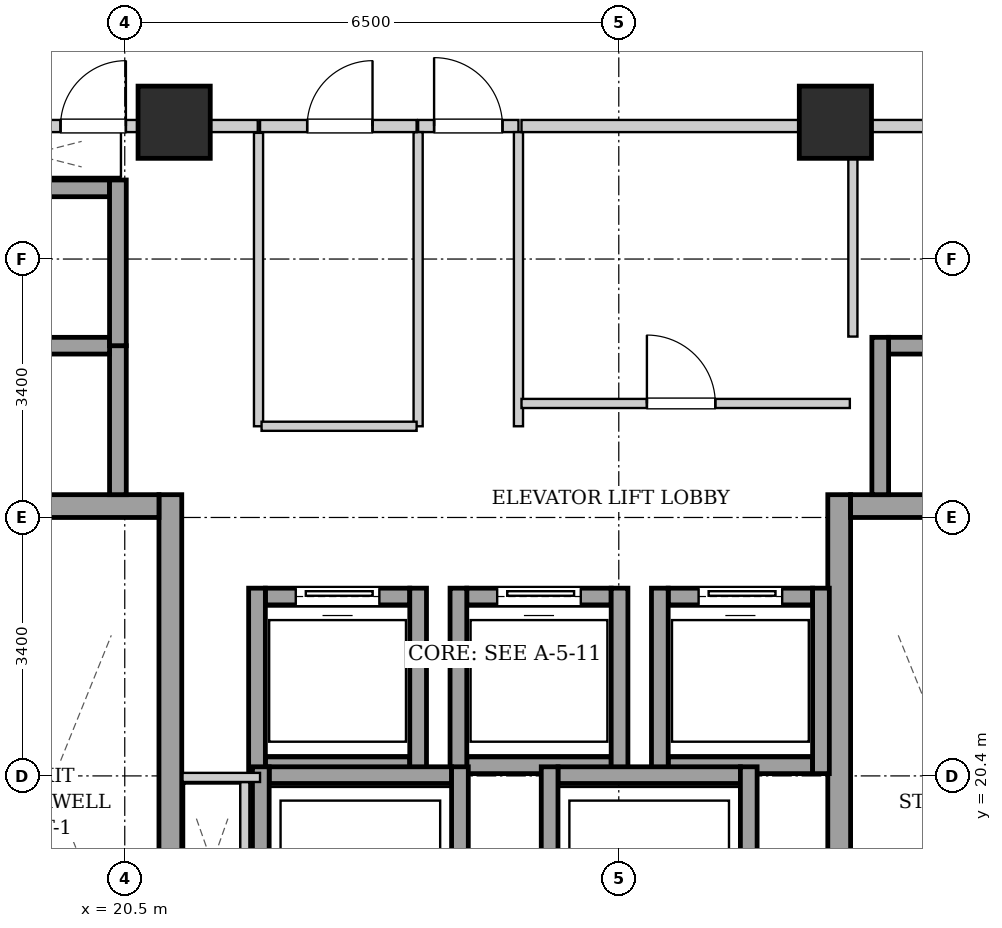
"""IFC4 building model, lengths in metres.
Left out: names, types, materials, properties, quantities, classifications, styles, units other than length and angle.
Written with IfcOpenShell. Run it as: python <this file> out.ifc"""

import sys

from ifc_helpers import new_model, si_unit, direction, frame, frame_2d, origin, origin_2d, place, context, subcontext, project, spatial, rectangle, extrude, element, fill, save


model = new_model("IFC4")
c1 = context("Model", 3, precision=1e-05, world=origin(), true_north=direction((0.0, 1.0)))
c2 = subcontext(c1, "Body", "Model", "MODEL_VIEW")
j1 = project(units=[si_unit("LENGTHUNIT", "METRE"), si_unit("PLANEANGLEUNIT", "RADIAN")], contexts=[c1])
p1 = place(None, origin())
s1 = spatial("IfcSite", under=j1, at=p1, CompositionType="ELEMENT")
p2 = place(p1, origin())
s2 = spatial("IfcBuilding", under=s1, at=p2, CompositionType="ELEMENT")
p3 = place(p2, frame((0.0, 0.0, 166.65)))
s3 = spatial("IfcBuildingStorey", under=s2, at=p3, CompositionType="ELEMENT", Elevation=166.65)
for number, where, z_axis, x_axis in (
    (1, (21.15, 29.0, 0.0), (0.0, 0.0, 1.0), (1.0, 0.0, 0.0)),
    (2, (29.85, 29.0, 0.0), (0.0, 0.0, 1.0), (1.0, 0.0, 0.0)),
):
    element("IfcColumn", number, at=place(p3, frame(where, z_axis=z_axis, x_axis=x_axis)), inside=s3, PredefinedType="COLUMN", context=c2, shape_type="SweptSolid", body=[
        extrude(rectangle(XDim=0.95, YDim=0.95, at=origin_2d()), origin(), (0.0, 0.0, 1.0), 3.25),
    ])
p4 = place(p3, frame((21.1, 15.1, 0.0), z_axis=(0.0, 0.0, 1.0), x_axis=(0.0, 1.0, 0.0)))
e3 = element("IfcWall", 3, at=p4, inside=s3, PredefinedType="SHEAR", context=c2, shape_type="SweptSolid", body=[
    extrude(rectangle(XDim=9.0, YDim=0.3, at=frame_2d((4.5, 0.0))), origin(), (0.0, 0.0, 1.0), 2.93),
])
p5 = place(p3, frame((18.1, 23.95, 0.0), z_axis=(0.0, 0.0, 1.0), x_axis=(1.0, 0.0, 0.0)))
e4 = element("IfcWall", 4, at=p5, inside=s3, PredefinedType="SHEAR", context=c2, shape_type="SweptSolid", body=[
    extrude(rectangle(XDim=2.85, YDim=0.3, at=frame_2d((1.425, 0.0))), origin(), (0.0, 0.0, 1.0), 2.93),
])
p6 = place(p3, frame((29.9, 15.1, 0.0), z_axis=(0.0, 0.0, 1.0), x_axis=(0.0, 1.0, 0.0)))
e5 = element("IfcWall", 5, at=p6, inside=s3, PredefinedType="SHEAR", context=c2, shape_type="SweptSolid", body=[
    extrude(rectangle(XDim=9.0, YDim=0.3, at=frame_2d((4.5, 0.0))), origin(), (0.0, 0.0, 1.0), 2.93),
])
p7 = place(p3, frame((30.05, 23.95, 0.0), z_axis=(0.0, 0.0, 1.0), x_axis=(1.0, 0.0, 0.0)))
e6 = element("IfcWall", 6, at=p7, inside=s3, PredefinedType="SHEAR", context=c2, shape_type="SweptSolid", body=[
    extrude(rectangle(XDim=2.85, YDim=0.3, at=frame_2d((1.425, 0.0))), origin(), (0.0, 0.0, 1.0), 2.93),
])
p8 = place(p3, frame((22.35, 20.54, 0.0), z_axis=(0.0, 0.0, 1.0), x_axis=(1.0, 0.0, 0.0)))
e7 = element("IfcWall", 7, at=p8, inside=s3, PredefinedType="SHEAR", context=c2, shape_type="SweptSolid", body=[
    extrude(rectangle(XDim=1.9, YDim=0.22, at=frame_2d((0.95, 0.0))), origin(), (0.0, 0.0, 1.0), 2.93),
])
p9 = place(p3, frame((22.35, 22.76, 0.0), z_axis=(0.0, 0.0, 1.0), x_axis=(1.0, 0.0, 0.0)))
e8 = element("IfcWall", 8, at=p9, inside=s3, PredefinedType="SHEAR", context=c2, shape_type="SweptSolid", body=[
    extrude(rectangle(XDim=1.9, YDim=0.22, at=frame_2d((0.95, 0.0))), origin(), (0.0, 0.0, 1.0), 2.93),
])
p10 = place(p9, frame((0.4, 0.0, 0.0)))
e9 = element("IfcOpeningElement", 9, at=p10, cuts=e8, PredefinedType="OPENING", context=c2, shape_type="SweptSolid", body=[
    extrude(rectangle(XDim=1.1, YDim=2.15, at=frame_2d((0.55, 1.075))), frame((0.0, 0.12, 0.0), z_axis=(0.0, -1.0, 0.0), x_axis=(1.0, 0.0, 0.0)), (0.0, 0.0, 1.0), 0.24),
])
for number, where, z_axis, x_axis in (
    (10, (22.24, 20.43, 0.0), (0.0, 0.0, 1.0), (0.0, 1.0, 0.0)),
    (11, (24.36, 20.43, 0.0), (0.0, 0.0, 1.0), (0.0, 1.0, 0.0)),
):
    element("IfcWall", number, at=place(p3, frame(where, z_axis=z_axis, x_axis=x_axis)), inside=s3, PredefinedType="SHEAR", context=c2, shape_type="SweptSolid", body=[
        extrude(rectangle(XDim=2.44, YDim=0.22, at=frame_2d((1.22, 0.0))), origin(), (0.0, 0.0, 1.0), 2.93),
    ])
p11 = place(p3, frame((25.0, 20.54, 0.0), z_axis=(0.0, 0.0, 1.0), x_axis=(1.0, 0.0, 0.0)))
e12 = element("IfcWall", 12, at=p11, inside=s3, PredefinedType="SHEAR", context=c2, shape_type="SweptSolid", body=[
    extrude(rectangle(XDim=1.9, YDim=0.22, at=frame_2d((0.95, 0.0))), origin(), (0.0, 0.0, 1.0), 2.93),
])
p12 = place(p3, frame((25.0, 22.76, 0.0), z_axis=(0.0, 0.0, 1.0), x_axis=(1.0, 0.0, 0.0)))
e13 = element("IfcWall", 13, at=p12, inside=s3, PredefinedType="SHEAR", context=c2, shape_type="SweptSolid", body=[
    extrude(rectangle(XDim=1.9, YDim=0.22, at=frame_2d((0.95, 0.0))), origin(), (0.0, 0.0, 1.0), 2.93),
])
p13 = place(p12, frame((0.4, 0.0, 0.0)))
e14 = element("IfcOpeningElement", 14, at=p13, cuts=e13, PredefinedType="OPENING", context=c2, shape_type="SweptSolid", body=[
    extrude(rectangle(XDim=1.1, YDim=2.15, at=frame_2d((0.55, 1.075))), frame((0.0, 0.12, 0.0), z_axis=(0.0, -1.0, 0.0), x_axis=(1.0, 0.0, 0.0)), (0.0, 0.0, 1.0), 0.24),
])
for number, where, z_axis, x_axis in (
    (15, (24.89, 20.43, 0.0), (0.0, 0.0, 1.0), (0.0, 1.0, 0.0)),
    (16, (27.01, 20.43, 0.0), (0.0, 0.0, 1.0), (0.0, 1.0, 0.0)),
):
    element("IfcWall", number, at=place(p3, frame(where, z_axis=z_axis, x_axis=x_axis)), inside=s3, PredefinedType="SHEAR", context=c2, shape_type="SweptSolid", body=[
        extrude(rectangle(XDim=2.44, YDim=0.22, at=frame_2d((1.22, 0.0))), origin(), (0.0, 0.0, 1.0), 2.93),
    ])
p14 = place(p3, frame((27.65, 20.54, 0.0), z_axis=(0.0, 0.0, 1.0), x_axis=(1.0, 0.0, 0.0)))
e17 = element("IfcWall", 17, at=p14, inside=s3, PredefinedType="SHEAR", context=c2, shape_type="SweptSolid", body=[
    extrude(rectangle(XDim=1.9, YDim=0.22, at=frame_2d((0.95, 0.0))), origin(), (0.0, 0.0, 1.0), 2.93),
])
p15 = place(p3, frame((27.65, 22.76, 0.0), z_axis=(0.0, 0.0, 1.0), x_axis=(1.0, 0.0, 0.0)))
e18 = element("IfcWall", 18, at=p15, inside=s3, PredefinedType="SHEAR", context=c2, shape_type="SweptSolid", body=[
    extrude(rectangle(XDim=1.9, YDim=0.22, at=frame_2d((0.95, 0.0))), origin(), (0.0, 0.0, 1.0), 2.93),
])
p16 = place(p15, frame((0.4, 0.0, 0.0)))
e19 = element("IfcOpeningElement", 19, at=p16, cuts=e18, PredefinedType="OPENING", context=c2, shape_type="SweptSolid", body=[
    extrude(rectangle(XDim=1.1, YDim=2.15, at=frame_2d((0.55, 1.075))), frame((0.0, 0.12, 0.0), z_axis=(0.0, -1.0, 0.0), x_axis=(1.0, 0.0, 0.0)), (0.0, 0.0, 1.0), 0.24),
])
for number, where, z_axis, x_axis in (
    (20, (27.54, 20.43, 0.0), (0.0, 0.0, 1.0), (0.0, 1.0, 0.0)),
    (21, (29.66, 20.43, 0.0), (0.0, 0.0, 1.0), (0.0, 1.0, 0.0)),
):
    element("IfcWall", number, at=place(p3, frame(where, z_axis=z_axis, x_axis=x_axis)), inside=s3, PredefinedType="SHEAR", context=c2, shape_type="SweptSolid", body=[
        extrude(rectangle(XDim=2.44, YDim=0.22, at=frame_2d((1.22, 0.0))), origin(), (0.0, 0.0, 1.0), 2.93),
    ])
p17 = place(p3, frame((20.41, 24.1, 0.0), z_axis=(0.0, 0.0, 1.0), x_axis=(0.0, 1.0, 0.0)))
e22 = element("IfcWall", 22, at=p17, inside=s3, PredefinedType="SHEAR", context=c2, shape_type="SweptSolid", body=[
    extrude(rectangle(XDim=1.96, YDim=0.22, at=frame_2d((0.98, 0.0))), origin(), (0.0, 0.0, 1.0), 2.93),
])
for number, where, z_axis, x_axis in (
    (23, (18.4, 26.06, 0.0), (0.0, 0.0, 1.0), (1.0, 0.0, 0.0)),
    (24, (18.4, 28.13, 0.0), (0.0, 0.0, 1.0), (1.0, 0.0, 0.0)),
):
    element("IfcWall", number, at=place(p3, frame(where, z_axis=z_axis, x_axis=x_axis)), inside=s3, PredefinedType="SHEAR", context=c2, shape_type="SweptSolid", body=[
        extrude(rectangle(XDim=1.9, YDim=0.22, at=frame_2d((0.95, 0.0))), origin(), (0.0, 0.0, 1.0), 2.93),
    ])
p18 = place(p3, frame((20.41, 26.06, 0.0), z_axis=(0.0, 0.0, 1.0), x_axis=(0.0, 1.0, 0.0)))
e25 = element("IfcWall", 25, at=p18, inside=s3, PredefinedType="SHEAR", context=c2, shape_type="SweptSolid", body=[
    extrude(rectangle(XDim=2.18, YDim=0.22, at=frame_2d((1.09, 0.0))), origin(), (0.0, 0.0, 1.0), 2.93),
])
p19 = place(p3, frame((30.55, 26.06, 0.0), z_axis=(0.0, 0.0, 1.0), x_axis=(1.0, 0.0, 0.0)))
e26 = element("IfcWall", 26, at=p19, inside=s3, PredefinedType="SHEAR", context=c2, shape_type="SweptSolid", body=[
    extrude(rectangle(XDim=1.9, YDim=0.22, at=frame_2d((0.95, 0.0))), origin(), (0.0, 0.0, 1.0), 2.93),
])
p20 = place(p3, frame((30.44, 24.1, 0.0), z_axis=(0.0, 0.0, 1.0), x_axis=(0.0, 1.0, 0.0)))
e27 = element("IfcWall", 27, at=p20, inside=s3, PredefinedType="SHEAR", context=c2, shape_type="SweptSolid", body=[
    extrude(rectangle(XDim=2.07, YDim=0.22, at=frame_2d((1.035, 0.0))), origin(), (0.0, 0.0, 1.0), 2.93),
])
p21 = place(p3, frame((22.4, 20.41, 0.0), z_axis=(0.0, 0.0, 1.0), x_axis=(1.0, 0.0, 0.0)))
e28 = element("IfcWall", 28, at=p21, inside=s3, PredefinedType="SHEAR", context=c2, shape_type="SweptSolid", body=[
    extrude(rectangle(XDim=2.4, YDim=0.22, at=frame_2d((1.2, 0.0))), origin(), (0.0, 0.0, 1.0), 2.93),
])
for number, where, z_axis, x_axis in (
    (29, (22.29, 17.98, 0.0), (0.0, 0.0, 1.0), (0.0, 1.0, 0.0)),
    (30, (24.91, 17.98, 0.0), (0.0, 0.0, 1.0), (0.0, 1.0, 0.0)),
):
    element("IfcWall", number, at=place(p3, frame(where, z_axis=z_axis, x_axis=x_axis)), inside=s3, PredefinedType="SHEAR", context=c2, shape_type="SweptSolid", body=[
        extrude(rectangle(XDim=2.54, YDim=0.22, at=frame_2d((1.27, 0.0))), origin(), (0.0, 0.0, 1.0), 2.93),
    ])
p22 = place(p3, frame((26.2, 20.41, 0.0), z_axis=(0.0, 0.0, 1.0), x_axis=(1.0, 0.0, 0.0)))
e31 = element("IfcWall", 31, at=p22, inside=s3, PredefinedType="SHEAR", context=c2, shape_type="SweptSolid", body=[
    extrude(rectangle(XDim=2.4, YDim=0.22, at=frame_2d((1.2, 0.0))), origin(), (0.0, 0.0, 1.0), 2.93),
])
for number, where, z_axis, x_axis in (
    (32, (26.09, 17.98, 0.0), (0.0, 0.0, 1.0), (0.0, 1.0, 0.0)),
    (33, (28.71, 17.98, 0.0), (0.0, 0.0, 1.0), (0.0, 1.0, 0.0)),
):
    element("IfcWall", number, at=place(p3, frame(where, z_axis=z_axis, x_axis=x_axis)), inside=s3, PredefinedType="SHEAR", context=c2, shape_type="SweptSolid", body=[
        extrude(rectangle(XDim=2.54, YDim=0.22, at=frame_2d((1.27, 0.0))), origin(), (0.0, 0.0, 1.0), 2.93),
    ])
p23 = place(p3, frame((24.36, 28.95, 0.0), z_axis=(0.0, 0.0, 1.0), x_axis=(1.0, 0.0, 0.0)))
e34 = element("IfcWall", 34, at=p23, inside=s3, PredefinedType="PARTITIONING", context=c2, shape_type="SweptSolid", body=[
    extrude(rectangle(XDim=1.32, YDim=0.16, at=frame_2d((0.66, 0.0))), origin(), (0.0, 0.0, 1.0), 2.382),
])
p24 = place(p23, frame((0.21, 0.0, 0.0)))
e35 = element("IfcOpeningElement", 35, at=p24, cuts=e34, PredefinedType="OPENING", context=c2, shape_type="SweptSolid", body=[
    extrude(rectangle(XDim=0.9, YDim=2.05, at=frame_2d((0.45, 1.025))), frame((0.0, 0.09, 0.0), z_axis=(0.0, -1.0, 0.0), x_axis=(1.0, 0.0, 0.0)), (0.0, 0.0, 1.0), 0.18),
])
p25 = place(p3, frame((17.96, 28.95, 0.0), z_axis=(0.0, 0.0, 1.0), x_axis=(1.0, 0.0, 0.0)))
e36 = element("IfcWall", 36, at=p25, inside=s3, PredefinedType="PARTITIONING", context=c2, shape_type="SweptSolid", body=[
    extrude(rectangle(XDim=4.29, YDim=0.16, at=frame_2d((2.145, 0.0))), origin(), (0.0, 0.0, 1.0), 2.382),
])
p26 = place(p25, frame((1.695, 0.0, 0.0)))
e37 = element("IfcOpeningElement", 37, at=p26, cuts=e36, PredefinedType="OPENING", context=c2, shape_type="SweptSolid", body=[
    extrude(rectangle(XDim=0.86, YDim=2.05, at=frame_2d((0.43, 1.025))), frame((0.0, 0.09, 0.0), z_axis=(0.0, -1.0, 0.0), x_axis=(1.0, 0.0, 0.0)), (0.0, 0.0, 1.0), 0.18),
])
p27 = place(p3, frame((22.08, 18.2, 0.0), z_axis=(0.0, 0.0, 1.0), x_axis=(0.0, 1.0, 0.0)))
e38 = element("IfcWall", 38, at=p27, inside=s3, PredefinedType="PARTITIONING", context=c2, shape_type="SweptSolid", body=[
    extrude(rectangle(XDim=2.12, YDim=0.12, at=frame_2d((1.06, 0.0))), origin(), (0.0, 0.0, 1.0), 2.93),
])
p28 = place(p3, frame((22.28, 20.38, 0.0), z_axis=(0.0, 0.0, 1.0), x_axis=(-1.0, 0.0, 0.0)))
e39 = element("IfcWall", 39, at=p28, inside=s3, PredefinedType="PARTITIONING", context=c2, shape_type="SweptSolid", body=[
    extrude(rectangle(XDim=1.02, YDim=0.12, at=frame_2d((0.51, 0.0))), origin(), (0.0, 0.0, 1.0), 2.93),
])
for number, where, z_axis, x_axis in (
    (40, (24.36, 25.0, 0.0), (0.0, 0.0, 1.0), (0.0, 1.0, 0.0)),
    (41, (25.68, 25.0, 0.0), (0.0, 0.0, 1.0), (0.0, 1.0, 0.0)),
):
    element("IfcWall", number, at=place(p3, frame(where, z_axis=z_axis, x_axis=x_axis)), inside=s3, PredefinedType="PARTITIONING", context=c2, shape_type="SweptSolid", body=[
        extrude(rectangle(XDim=3.87, YDim=0.12, at=frame_2d((1.935, 0.0))), origin(), (0.0, 0.0, 1.0), 2.93),
    ])
p29 = place(p3, frame((30.08, 26.18, 0.0), z_axis=(0.0, 0.0, 1.0), x_axis=(0.0, 1.0, 0.0)))
e42 = element("IfcWall", 42, at=p29, inside=s3, PredefinedType="PARTITIONING", context=c2, shape_type="SweptSolid", body=[
    extrude(rectangle(XDim=2.68, YDim=0.12, at=frame_2d((1.34, 0.0))), origin(), (0.0, 0.0, 1.0), 2.93),
])
p30 = place(p3, frame((30.08, 28.95, 0.0), z_axis=(0.0, 0.0, 1.0), x_axis=(1.0, 0.0, 0.0)))
e43 = element("IfcWall", 43, at=p30, inside=s3, PredefinedType="PARTITIONING", context=c2, shape_type="SweptSolid", body=[
    extrude(rectangle(XDim=2.96, YDim=0.16, at=frame_2d((1.48, 0.0))), origin(), (0.0, 0.0, 1.0), 2.93),
])
p31 = place(p30, frame((1.045, 0.0, 0.0)))
e44 = element("IfcOpeningElement", 44, at=p31, cuts=e43, PredefinedType="OPENING", context=c2, shape_type="SweptSolid", body=[
    extrude(rectangle(XDim=0.86, YDim=2.05, at=frame_2d((0.43, 1.025))), frame((0.0, 0.09, 0.0), z_axis=(0.0, -1.0, 0.0), x_axis=(1.0, 0.0, 0.0)), (0.0, 0.0, 1.0), 0.18),
])
p32 = place(p3, frame((22.26, 25.0, 0.0), z_axis=(0.0, 0.0, 1.0), x_axis=(0.0, 1.0, 0.0)))
e45 = element("IfcWall", 45, at=p32, inside=s3, PredefinedType="PARTITIONING", context=c2, shape_type="SweptSolid", body=[
    extrude(rectangle(XDim=3.86, YDim=0.12, at=frame_2d((1.93, 0.0))), origin(), (0.0, 0.0, 1.0), 2.93),
])
p33 = place(p3, frame((22.3, 25.0, 0.0), z_axis=(0.0, 0.0, 1.0), x_axis=(1.0, 0.0, 0.0)))
e46 = element("IfcWall", 46, at=p33, inside=s3, PredefinedType="PARTITIONING", context=c2, shape_type="SweptSolid", body=[
    extrude(rectangle(XDim=2.04, YDim=0.12, at=frame_2d((1.02, 0.0))), origin(), (0.0, 0.0, 1.0), 2.93),
])
p34 = place(p3, frame((22.28, 28.95, 0.0), z_axis=(0.0, 0.0, 1.0), x_axis=(1.0, 0.0, 0.0)))
e47 = element("IfcWall", 47, at=p34, inside=s3, PredefinedType="PARTITIONING", context=c2, shape_type="SweptSolid", body=[
    extrude(rectangle(XDim=2.06, YDim=0.16, at=frame_2d((1.03, 0.0))), origin(), (0.0, 0.0, 1.0), 2.382),
])
p35 = place(p34, frame((0.62, 0.0, 0.0)))
e48 = element("IfcOpeningElement", 48, at=p35, cuts=e47, PredefinedType="OPENING", context=c2, shape_type="SweptSolid", body=[
    extrude(rectangle(XDim=0.86, YDim=2.05, at=frame_2d((0.43, 1.025))), frame((0.0, 0.09, 0.0), z_axis=(0.0, -1.0, 0.0), x_axis=(1.0, 0.0, 0.0)), (0.0, 0.0, 1.0), 0.18),
])
p36 = place(p3, frame((25.72, 28.95, 0.0), z_axis=(0.0, 0.0, 1.0), x_axis=(1.0, 0.0, 0.0)))
e49 = element("IfcWall", 49, at=p36, inside=s3, PredefinedType="PARTITIONING", context=c2, shape_type="SweptSolid", body=[
    extrude(rectangle(XDim=4.32, YDim=0.16, at=frame_2d((2.16, 0.0))), origin(), (0.0, 0.0, 1.0), 2.382),
])
p37 = place(p3, frame((25.72, 25.3, 0.0), z_axis=(0.0, 0.0, 1.0), x_axis=(1.0, 0.0, 0.0)))
e50 = element("IfcWall", 50, at=p37, inside=s3, PredefinedType="PARTITIONING", context=c2, shape_type="SweptSolid", body=[
    extrude(rectangle(XDim=4.32, YDim=0.12, at=frame_2d((2.16, 0.0))), origin(), (0.0, 0.0, 1.0), 2.93),
])
p38 = place(p37, frame((1.65, 0.0, 0.0)))
e51 = element("IfcOpeningElement", 51, at=p38, cuts=e50, PredefinedType="OPENING", context=c2, shape_type="SweptSolid", body=[
    extrude(rectangle(XDim=0.9, YDim=2.05, at=frame_2d((0.45, 1.025))), frame((0.0, 0.07, 0.0), z_axis=(0.0, -1.0, 0.0), x_axis=(1.0, 0.0, 0.0)), (0.0, 0.0, 1.0), 0.14),
])
p39 = place(p10, origin())
e52 = element("IfcDoor", 52, at=p39, inside=s3, OperationType="SLIDING_TO_LEFT", PredefinedType="DOOR", context=c2, shape_type="SweptSolid", body=[
    extrude(rectangle(XDim=1.1, YDim=2.15, at=frame_2d((0.55, 1.075))), frame((0.0, 0.025, 0.0), z_axis=(0.0, -1.0, 0.0), x_axis=(1.0, 0.0, 0.0)), (0.0, 0.0, 1.0), 0.05),
])
fill(e9, e52)
p40 = place(p13, origin())
e53 = element("IfcDoor", 53, at=p40, inside=s3, OperationType="SLIDING_TO_LEFT", PredefinedType="DOOR", context=c2, shape_type="SweptSolid", body=[
    extrude(rectangle(XDim=1.1, YDim=2.15, at=frame_2d((0.55, 1.075))), frame((0.0, 0.025, 0.0), z_axis=(0.0, -1.0, 0.0), x_axis=(1.0, 0.0, 0.0)), (0.0, 0.0, 1.0), 0.05),
])
fill(e14, e53)
p41 = place(p16, origin())
e54 = element("IfcDoor", 54, at=p41, inside=s3, OperationType="SLIDING_TO_LEFT", PredefinedType="DOOR", context=c2, shape_type="SweptSolid", body=[
    extrude(rectangle(XDim=1.1, YDim=2.15, at=frame_2d((0.55, 1.075))), frame((0.0, 0.025, 0.0), z_axis=(0.0, -1.0, 0.0), x_axis=(1.0, 0.0, 0.0)), (0.0, 0.0, 1.0), 0.05),
])
fill(e19, e54)
p42 = place(p24, origin())
e55 = element("IfcDoor", 55, at=p42, inside=s3, OperationType="SINGLE_SWING_LEFT", PredefinedType="DOOR", context=c2, shape_type="SweptSolid", body=[
    extrude(rectangle(XDim=0.9, YDim=2.05, at=frame_2d((0.45, 1.025))), frame((0.0, 0.025, 0.0), z_axis=(0.0, -1.0, 0.0), x_axis=(1.0, 0.0, 0.0)), (0.0, 0.0, 1.0), 0.05),
])
fill(e35, e55)
p43 = place(p26, origin())
e56 = element("IfcDoor", 56, at=p43, inside=s3, OperationType="SINGLE_SWING_RIGHT", PredefinedType="DOOR", context=c2, shape_type="SweptSolid", body=[
    extrude(rectangle(XDim=0.86, YDim=2.05, at=frame_2d((0.43, 1.025))), frame((0.0, 0.025, 0.0), z_axis=(0.0, -1.0, 0.0), x_axis=(1.0, 0.0, 0.0)), (0.0, 0.0, 1.0), 0.05),
])
fill(e37, e56)
p44 = place(p35, origin())
e57 = element("IfcDoor", 57, at=p44, inside=s3, OperationType="SINGLE_SWING_RIGHT", PredefinedType="DOOR", context=c2, shape_type="SweptSolid", body=[
    extrude(rectangle(XDim=0.86, YDim=2.05, at=frame_2d((0.43, 1.025))), frame((0.0, 0.025, 0.0), z_axis=(0.0, -1.0, 0.0), x_axis=(1.0, 0.0, 0.0)), (0.0, 0.0, 1.0), 0.05),
])
fill(e48, e57)
p45 = place(p38, origin())
e58 = element("IfcDoor", 58, at=p45, inside=s3, OperationType="SINGLE_SWING_LEFT", PredefinedType="DOOR", context=c2, shape_type="SweptSolid", body=[
    extrude(rectangle(XDim=0.9, YDim=2.05, at=frame_2d((0.45, 1.025))), frame((0.0, 0.025, 0.0), z_axis=(0.0, -1.0, 0.0), x_axis=(1.0, 0.0, 0.0)), (0.0, 0.0, 1.0), 0.05),
])
fill(e51, e58)
save(model, sys.argv[1])
